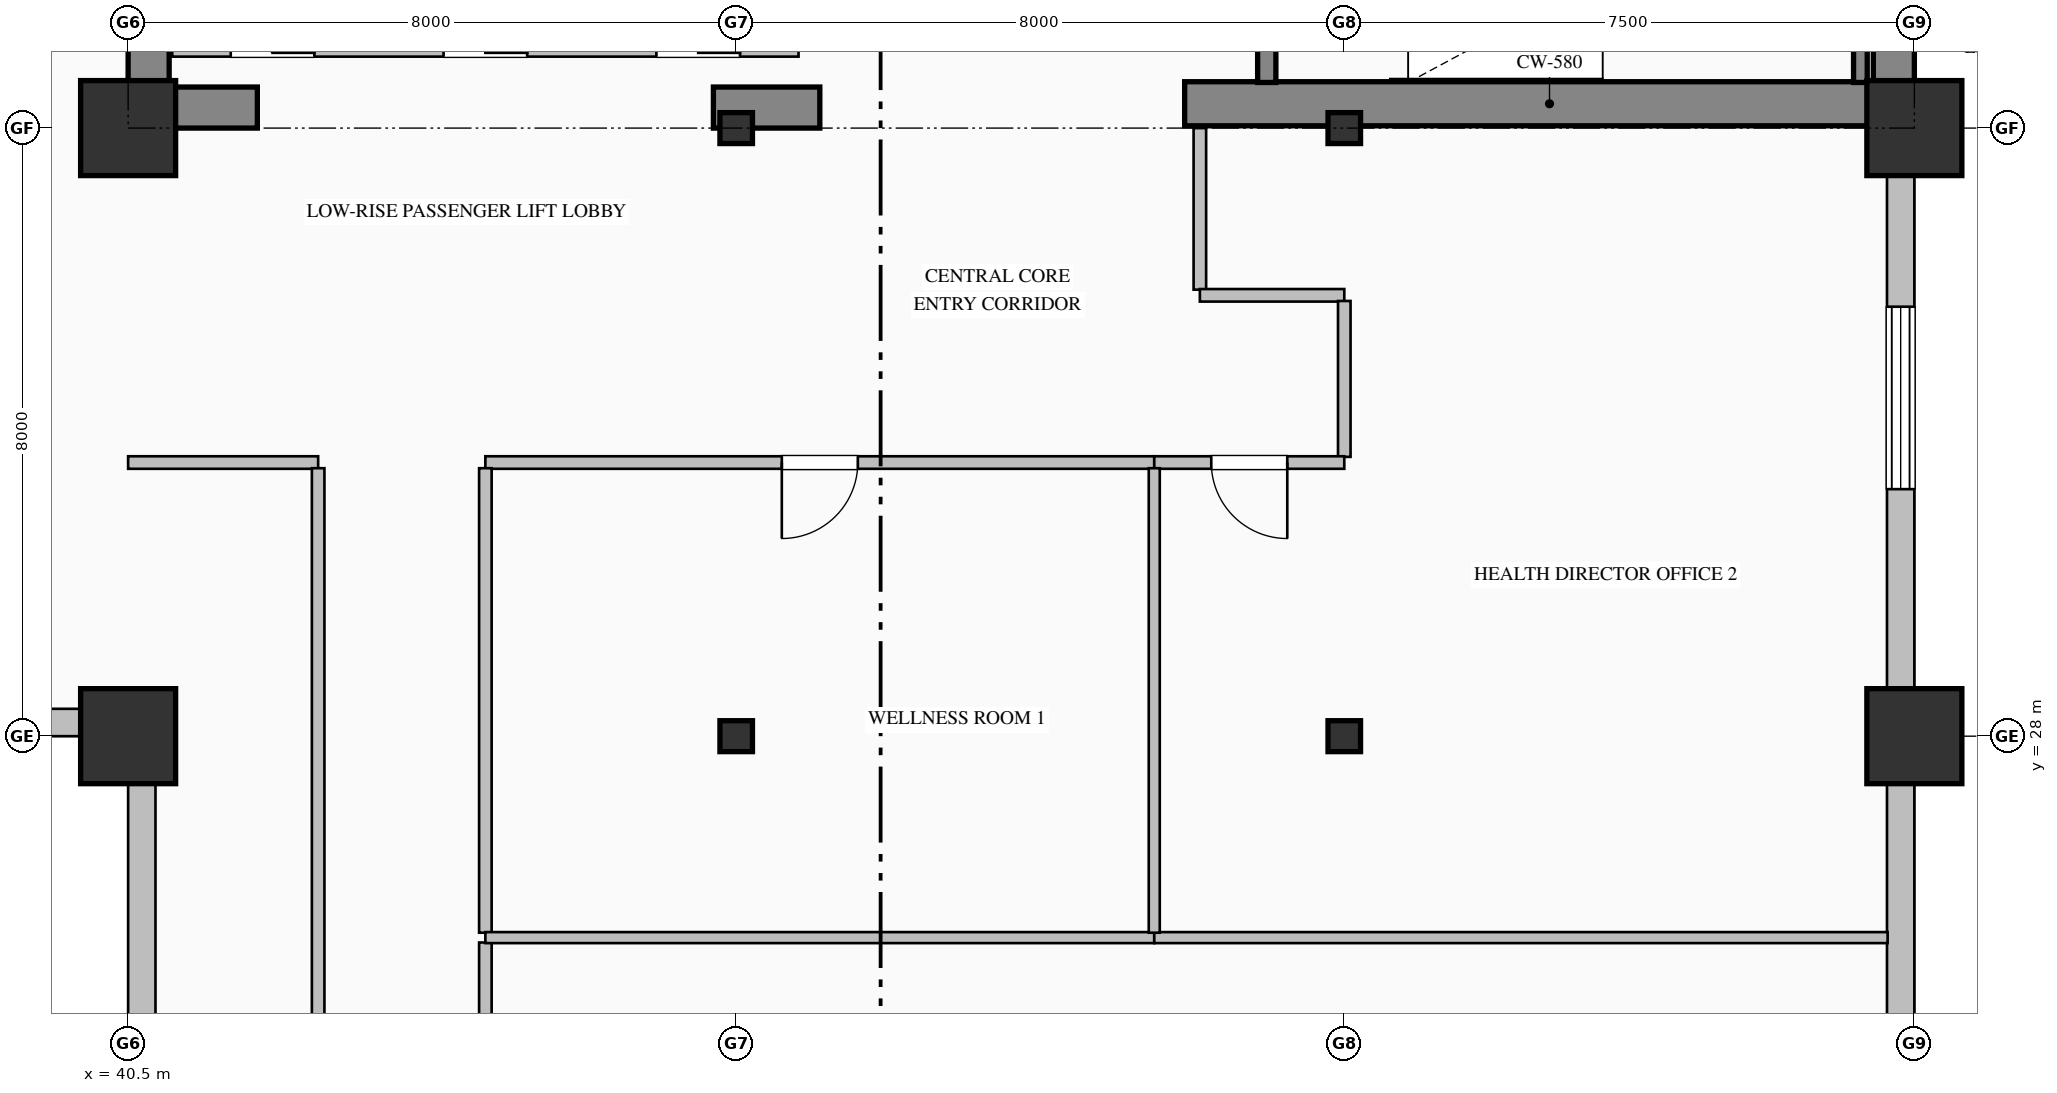
"""IFC4 building model, lengths in metres.
Left out: names, types, materials, properties, quantities, classifications, styles, units other than length and angle.
Written with IfcOpenShell. Run it as: python <this file> out.ifc"""

import sys

from ifc_helpers import new_model, si_unit, direction, frame, frame_2d, origin, origin_2d, place, context, subcontext, project, spatial, rectangle, hollow_rectangle, i_section, extrude, element, fill, save


model = new_model("IFC4")
c1 = context("Model", 3, precision=1e-05, world=origin(), true_north=direction((0.0, 1.0)))
c2 = subcontext(c1, "Body", "Model", "MODEL_VIEW")
j1 = project(units=[si_unit("LENGTHUNIT", "METRE"), si_unit("PLANEANGLEUNIT", "RADIAN")], contexts=[c1])
p1 = place(None, origin())
s1 = spatial("IfcSite", under=j1, at=p1, CompositionType="ELEMENT")
p2 = place(p1, origin())
s2 = spatial("IfcBuilding", under=s1, at=p2, CompositionType="ELEMENT")
p3 = place(p2, frame((0.0, 0.0, 84.2)))
s3 = spatial("IfcBuildingStorey", under=s2, at=p3, CompositionType="ELEMENT", Elevation=84.2)
p4 = place(p3, frame((63.73, 36.32, 0.0), z_axis=(0.0, 0.0, 1.0), x_axis=(0.0, 1.0, 0.0)))
e1 = element("IfcWall", 1, at=p4, inside=s3, PredefinedType="SHEAR", context=c2, shape_type="SweptSolid", body=[
    extrude(rectangle(XDim=15.14, YDim=0.54, at=frame_2d((7.57, 0.0))), origin(), (0.0, 0.0, 1.0), 3.75),
])
p5 = place(p3, frame((40.77, 36.54, 0.0), z_axis=(0.0, 0.0, 1.0), x_axis=(0.0, 1.0, 0.0)))
e2 = element("IfcWall", 2, at=p5, inside=s3, PredefinedType="SHEAR", context=c2, shape_type="SweptSolid", body=[
    extrude(rectangle(XDim=7.86, YDim=0.54, at=frame_2d((3.93, 0.0))), origin(), (0.0, 0.0, 1.0), 3.75),
])
p6 = place(p3, frame((40.5, 36.27, 0.0), z_axis=(0.0, 0.0, 1.0), x_axis=(1.0, 0.0, 0.0)))
e3 = element("IfcWall", 3, at=p6, inside=s3, PredefinedType="SHEAR", context=c2, shape_type="SweptSolid", body=[
    extrude(rectangle(XDim=1.7, YDim=0.54, at=frame_2d((0.85, 0.0))), origin(), (0.0, 0.0, 1.0), 3.75),
])
p7 = place(p3, frame((48.2, 36.27, 0.0), z_axis=(0.0, 0.0, 1.0), x_axis=(1.0, 0.0, 0.0)))
e4 = element("IfcWall", 4, at=p7, inside=s3, PredefinedType="SHEAR", context=c2, shape_type="SweptSolid", body=[
    extrude(rectangle(XDim=1.4, YDim=0.54, at=frame_2d((0.7, 0.0))), origin(), (0.0, 0.0, 1.0), 3.75),
])
p8 = place(p3, frame((54.4, 36.32, 0.0), z_axis=(0.0, 0.0, 1.0), x_axis=(1.0, 0.0, 0.0)))
e5 = element("IfcWall", 5, at=p8, inside=s3, PredefinedType="SHEAR", context=c2, shape_type="SweptSolid", body=[
    extrude(rectangle(XDim=9.6, YDim=0.58, at=frame_2d((4.8, 0.0))), origin(), (0.0, 0.0, 1.0), 4.0),
])
for number, where, z_axis, x_axis in (
    (6, (40.5, 28.0, 0.0), (0.0, 0.0, 1.0), (1.0, 0.0, 0.0)),
    (7, (40.5, 36.0, 0.0), (0.0, 0.0, 1.0), (1.0, 0.0, 0.0)),
):
    element("IfcColumn", number, at=place(p3, frame(where, z_axis=z_axis, x_axis=x_axis)), inside=s3, PredefinedType="COLUMN", context=c2, shape_type="SweptSolid", body=[
        extrude(hollow_rectangle(XDim=1.25, YDim=1.25, WallThickness=0.045, at=origin_2d()), origin(), (0.0, 0.0, 1.0), 4.0),
    ])
for number, where, z_axis, x_axis in (
    (8, (48.5, 28.0, 0.0), (0.0, 0.0, 1.0), (1.0, 0.0, 0.0)),
    (9, (48.5, 36.0, 0.0), (0.0, 0.0, 1.0), (1.0, 0.0, 0.0)),
    (10, (56.5, 28.0, 0.0), (0.0, 0.0, 1.0), (1.0, 0.0, 0.0)),
    (11, (56.5, 36.0, 0.0), (0.0, 0.0, 1.0), (1.0, 0.0, 0.0)),
):
    element("IfcColumn", number, at=place(p3, frame(where, z_axis=z_axis, x_axis=x_axis)), inside=s3, PredefinedType="COLUMN", context=c2, shape_type="SweptSolid", body=[
        extrude(i_section(OverallWidth=0.407, OverallDepth=0.428, WebThickness=0.02, FlangeThickness=0.035, FilletRadius=0.022, at=origin_2d()), origin(), (0.0, 0.0, 1.0), 4.0),
    ])
for number, where, z_axis, x_axis in (
    (12, (64.0, 28.0, 0.0), (0.0, 0.0, 1.0), (1.0, 0.0, 0.0)),
    (13, (64.0, 36.0, 0.0), (0.0, 0.0, 1.0), (1.0, 0.0, 0.0)),
):
    element("IfcColumn", number, at=place(p3, frame(where, z_axis=z_axis, x_axis=x_axis)), inside=s3, PredefinedType="COLUMN", context=c2, shape_type="SweptSolid", body=[
        extrude(hollow_rectangle(XDim=1.25, YDim=1.25, WallThickness=0.045, at=origin_2d()), origin(), (0.0, 0.0, 1.0), 4.0),
    ])
p9 = place(p3, frame((40.68, 8.0, 0.0), z_axis=(0.0, 0.0, 1.0), x_axis=(0.0, 1.0, 0.0)))
e14 = element("IfcWall", 14, at=p9, inside=s3, PredefinedType="SOLIDWALL", context=c2, shape_type="SweptSolid", body=[
    extrude(rectangle(XDim=20.36, YDim=0.36, at=frame_2d((10.18, 0.0))), origin(), (0.0, 0.0, 1.0), 3.05),
])
p10 = place(p9, frame((6.6, 0.0, 0.7)))
e15 = element("IfcOpeningElement", 15, at=p10, cuts=e14, PredefinedType="OPENING", context=c2, shape_type="SweptSolid", body=[
    extrude(rectangle(XDim=1.2, YDim=1.85, at=frame_2d((0.6, 0.925))), frame((0.0, 0.19, 0.0), z_axis=(0.0, -1.0, 0.0), x_axis=(1.0, 0.0, 0.0)), (0.0, 0.0, 1.0), 0.38),
])
p11 = place(p9, frame((13.8, 0.0, 0.7)))
e16 = element("IfcOpeningElement", 16, at=p11, cuts=e14, PredefinedType="OPENING", context=c2, shape_type="SweptSolid", body=[
    extrude(rectangle(XDim=1.2, YDim=1.85, at=frame_2d((0.6, 0.925))), frame((0.0, 0.19, 0.0), z_axis=(0.0, -1.0, 0.0), x_axis=(1.0, 0.0, 0.0)), (0.0, 0.0, 1.0), 0.38),
])
p12 = place(p3, frame((40.52, 28.18, 0.0), z_axis=(0.0, 0.0, 1.0), x_axis=(-1.0, 0.0, 0.0)))
e17 = element("IfcWall", 17, at=p12, inside=s3, PredefinedType="SOLIDWALL", context=c2, shape_type="SweptSolid", body=[
    extrude(rectangle(XDim=36.52, YDim=0.36, at=frame_2d((18.26, 0.0))), origin(), (0.0, 0.0, 1.0), 3.05),
])
p13 = place(p12, frame((10.2, 0.0, 0.7)))
e18 = element("IfcOpeningElement", 18, at=p13, cuts=e17, PredefinedType="OPENING", context=c2, shape_type="SweptSolid", body=[
    extrude(rectangle(XDim=1.2, YDim=1.85, at=frame_2d((0.6, 0.925))), frame((0.0, 0.19, 0.0), z_axis=(0.0, -1.0, 0.0), x_axis=(1.0, 0.0, 0.0)), (0.0, 0.0, 1.0), 0.38),
])
p14 = place(p12, frame((17.4, 0.0, 0.7)))
e19 = element("IfcOpeningElement", 19, at=p14, cuts=e17, PredefinedType="OPENING", context=c2, shape_type="SweptSolid", body=[
    extrude(rectangle(XDim=1.2, YDim=1.85, at=frame_2d((0.6, 0.925))), frame((0.0, 0.19, 0.0), z_axis=(0.0, -1.0, 0.0), x_axis=(1.0, 0.0, 0.0)), (0.0, 0.0, 1.0), 0.38),
])
p15 = place(p12, frame((21.0, 0.0, 0.7)))
e20 = element("IfcOpeningElement", 20, at=p15, cuts=e17, PredefinedType="OPENING", context=c2, shape_type="SweptSolid", body=[
    extrude(rectangle(XDim=1.2, YDim=1.85, at=frame_2d((0.6, 0.925))), frame((0.0, 0.19, 0.0), z_axis=(0.0, -1.0, 0.0), x_axis=(1.0, 0.0, 0.0)), (0.0, 0.0, 1.0), 0.38),
])
p16 = place(p12, frame((28.2, 0.0, 0.7)))
e21 = element("IfcOpeningElement", 21, at=p16, cuts=e17, PredefinedType="OPENING", context=c2, shape_type="SweptSolid", body=[
    extrude(rectangle(XDim=1.2, YDim=1.85, at=frame_2d((0.6, 0.925))), frame((0.0, 0.19, 0.0), z_axis=(0.0, -1.0, 0.0), x_axis=(1.0, 0.0, 0.0)), (0.0, 0.0, 1.0), 0.38),
])
p17 = place(p3, frame((63.82, 36.05, 0.0), z_axis=(0.0, 0.0, 1.0), x_axis=(0.0, -1.0, 0.0)))
e22 = element("IfcWall", 22, at=p17, inside=s3, PredefinedType="SOLIDWALL", context=c2, shape_type="SweptSolid", body=[
    extrude(rectangle(XDim=28.05, YDim=0.36, at=frame_2d((14.025, 0.0))), origin(), (0.0, 0.0, 1.0), 3.25),
])
p18 = place(p17, frame((2.4, 0.0, 0.8)))
e23 = element("IfcOpeningElement", 23, at=p18, cuts=e22, PredefinedType="OPENING", context=c2, shape_type="SweptSolid", body=[
    extrude(rectangle(XDim=2.4, YDim=2.15, at=frame_2d((1.2, 1.075))), frame((0.0, 0.19, 0.0), z_axis=(0.0, -1.0, 0.0), x_axis=(1.0, 0.0, 0.0)), (0.0, 0.0, 1.0), 0.38),
])
p19 = place(p17, frame((13.2, 0.0, 0.8)))
e24 = element("IfcOpeningElement", 24, at=p19, cuts=e22, PredefinedType="OPENING", context=c2, shape_type="SweptSolid", body=[
    extrude(rectangle(XDim=2.4, YDim=2.15, at=frame_2d((1.2, 1.075))), frame((0.0, 0.19, 0.0), z_axis=(0.0, -1.0, 0.0), x_axis=(1.0, 0.0, 0.0)), (0.0, 0.0, 1.0), 0.38),
])
p20 = place(p3, frame((55.48, 39.75, 0.0), z_axis=(0.0, 0.0, 1.0), x_axis=(0.0, -1.0, 0.0)))
e25 = element("IfcWall", 25, at=p20, inside=s3, PredefinedType="SOLIDWALL", context=c2, shape_type="SweptSolid", body=[
    extrude(rectangle(XDim=3.15, YDim=0.24, at=frame_2d((1.575, 0.0))), origin(), (0.0, 0.0, 1.0), 4.0),
])
p21 = place(p20, frame((1.0, 0.0, 0.0)))
e26 = element("IfcOpeningElement", 26, at=p21, cuts=e25, PredefinedType="OPENING", context=c2, shape_type="SweptSolid", body=[
    extrude(rectangle(XDim=1.15, YDim=2.2, at=frame_2d((0.575, 1.1))), frame((0.0, 0.13, 0.0), z_axis=(0.0, -1.0, 0.0), x_axis=(1.0, 0.0, 0.0)), (0.0, 0.0, 1.0), 0.26),
])
p22 = place(p3, frame((63.29, 36.6, 0.0), z_axis=(0.0, 0.0, 1.0), x_axis=(0.0, 1.0, 0.0)))
e27 = element("IfcWall", 27, at=p22, inside=s3, PredefinedType="SOLIDWALL", context=c2, shape_type="SweptSolid", body=[
    extrude(rectangle(XDim=3.15, YDim=0.18, at=frame_2d((1.575, 0.0))), origin(), (0.0, 0.0, 1.0), 4.0),
])
p23 = place(p3, frame((49.32, 37.05, 0.0), z_axis=(0.0, 0.0, 1.0), x_axis=(-1.0, 0.0, 0.0)))
e28 = element("IfcWall", 28, at=p23, inside=s3, PredefinedType="PARTITIONING", context=c2, shape_type="SweptSolid", body=[
    extrude(rectangle(XDim=8.24, YDim=0.22, at=frame_2d((4.12, 0.0))), origin(), (0.0, 0.0, 1.0), 3.75),
])
p24 = place(p23, frame((6.37, 0.0, 0.0)))
e29 = element("IfcOpeningElement", 29, at=p24, cuts=e28, PredefinedType="OPENING", context=c2, shape_type="SweptSolid", body=[
    extrude(rectangle(XDim=1.1, YDim=2.2, at=frame_2d((0.55, 1.1))), frame((0.0, 0.12, 0.0), z_axis=(0.0, -1.0, 0.0), x_axis=(1.0, 0.0, 0.0)), (0.0, 0.0, 1.0), 0.24),
])
p25 = place(p23, frame((3.57, 0.0, 0.0)))
e30 = element("IfcOpeningElement", 30, at=p25, cuts=e28, PredefinedType="OPENING", context=c2, shape_type="SweptSolid", body=[
    extrude(rectangle(XDim=1.1, YDim=2.2, at=frame_2d((0.55, 1.1))), frame((0.0, 0.12, 0.0), z_axis=(0.0, -1.0, 0.0), x_axis=(1.0, 0.0, 0.0)), (0.0, 0.0, 1.0), 0.24),
])
p26 = place(p23, frame((0.77, 0.0, 0.0)))
e31 = element("IfcOpeningElement", 31, at=p26, cuts=e28, PredefinedType="OPENING", context=c2, shape_type="SweptSolid", body=[
    extrude(rectangle(XDim=1.1, YDim=2.2, at=frame_2d((0.55, 1.1))), frame((0.0, 0.12, 0.0), z_axis=(0.0, -1.0, 0.0), x_axis=(1.0, 0.0, 0.0)), (0.0, 0.0, 1.0), 0.24),
])
p27 = place(p3, frame((54.0, 31.6, 0.0), z_axis=(0.0, 0.0, 1.0), x_axis=(-1.0, 0.0, 0.0)))
e32 = element("IfcWall", 32, at=p27, inside=s3, PredefinedType="PARTITIONING", context=c2, shape_type="SweptSolid", body=[
    extrude(rectangle(XDim=8.8, YDim=0.165, at=frame_2d((4.4, 0.0))), origin(), (0.0, 0.0, 1.0), 3.75),
])
p28 = place(p27, frame((3.9, 0.0, 0.0)))
e33 = element("IfcOpeningElement", 33, at=p28, cuts=e32, PredefinedType="OPENING", context=c2, shape_type="SweptSolid", body=[
    extrude(rectangle(XDim=1.0, YDim=2.15, at=frame_2d((0.5, 1.075))), frame((0.0, 0.093, 0.0), z_axis=(0.0, -1.0, 0.0), x_axis=(1.0, 0.0, 0.0)), (0.0, 0.0, 1.0), 0.185),
])
p29 = place(p3, frame((54.6, 36.0, 0.0), z_axis=(0.0, 0.0, 1.0), x_axis=(0.0, -1.0, 0.0)))
e34 = element("IfcWall", 34, at=p29, inside=s3, PredefinedType="PARTITIONING", context=c2, shape_type="SweptSolid", body=[
    extrude(rectangle(XDim=2.125, YDim=0.165, at=frame_2d((1.063, 0.0))), origin(), (0.0, 0.0, 1.0), 3.75),
])
p30 = place(p3, frame((54.6, 33.8, 0.0), z_axis=(0.0, 0.0, 1.0), x_axis=(1.0, 0.0, 0.0)))
e35 = element("IfcWall", 35, at=p30, inside=s3, PredefinedType="PARTITIONING", context=c2, shape_type="SweptSolid", body=[
    extrude(rectangle(XDim=1.9, YDim=0.165, at=frame_2d((0.95, 0.0))), origin(), (0.0, 0.0, 1.0), 3.75),
])
p31 = place(p3, frame((56.5, 33.726, 0.0), z_axis=(0.0, 0.0, 1.0), x_axis=(0.0, -1.0, 0.0)))
e36 = element("IfcWall", 36, at=p31, inside=s3, PredefinedType="PARTITIONING", context=c2, shape_type="SweptSolid", body=[
    extrude(rectangle(XDim=2.051, YDim=0.165, at=frame_2d((1.025, 0.0))), origin(), (0.0, 0.0, 1.0), 3.042),
])
p32 = place(p3, frame((56.5, 31.6, 0.0), z_axis=(0.0, 0.0, 1.0), x_axis=(-1.0, 0.0, 0.0)))
e37 = element("IfcWall", 37, at=p32, inside=s3, PredefinedType="PARTITIONING", context=c2, shape_type="SweptSolid", body=[
    extrude(rectangle(XDim=2.5, YDim=0.165, at=frame_2d((1.25, 0.0))), origin(), (0.0, 0.0, 1.0), 3.75),
])
p33 = place(p32, frame((0.75, 0.0, 0.0)))
e38 = element("IfcOpeningElement", 38, at=p33, cuts=e37, PredefinedType="OPENING", context=c2, shape_type="SweptSolid", body=[
    extrude(rectangle(XDim=1.0, YDim=2.15, at=frame_2d((0.5, 1.075))), frame((0.0, 0.093, 0.0), z_axis=(0.0, -1.0, 0.0), x_axis=(1.0, 0.0, 0.0)), (0.0, 0.0, 1.0), 0.185),
])
p34 = place(p3, frame((43.0, 31.6, 0.0), z_axis=(0.0, 0.0, 1.0), x_axis=(-1.0, 0.0, 0.0)))
e39 = element("IfcWall", 39, at=p34, inside=s3, PredefinedType="PARTITIONING", context=c2, shape_type="SweptSolid", body=[
    extrude(rectangle(XDim=2.5, YDim=0.165, at=frame_2d((1.25, 0.0))), origin(), (0.0, 0.0, 1.0), 3.75),
])
p35 = place(p3, frame((45.2, 25.285, 0.0), z_axis=(0.0, 0.0, 1.0), x_axis=(0.0, -1.0, 0.0)))
e40 = element("IfcWall", 40, at=p35, inside=s3, PredefinedType="PARTITIONING", context=c2, shape_type="SweptSolid", body=[
    extrude(rectangle(XDim=10.511, YDim=0.165, at=frame_2d((5.255, 0.0))), origin(), (0.0, 0.0, 1.0), 3.75),
])
p36 = place(p3, frame((45.2, 31.525, 0.0), z_axis=(0.0, 0.0, 1.0), x_axis=(0.0, -1.0, 0.0)))
e41 = element("IfcWall", 41, at=p36, inside=s3, PredefinedType="PARTITIONING", context=c2, shape_type="SweptSolid", body=[
    extrude(rectangle(XDim=6.111, YDim=0.165, at=frame_2d((3.055, 0.0))), origin(), (0.0, 0.0, 1.0), 3.75),
])
p37 = place(p3, frame((43.0, 12.574, 0.0), z_axis=(0.0, 0.0, 1.0), x_axis=(0.0, 1.0, 0.0)))
e42 = element("IfcWall", 42, at=p37, inside=s3, PredefinedType="PARTITIONING", context=c2, shape_type="SweptSolid", body=[
    extrude(rectangle(XDim=18.951, YDim=0.165, at=frame_2d((9.476, 0.0))), origin(), (0.0, 0.0, 1.0), 3.75),
])
p38 = place(p37, frame((9.025, 0.0, 0.0)))
e43 = element("IfcOpeningElement", 43, at=p38, cuts=e42, PredefinedType="OPENING", context=c2, shape_type="SweptSolid", body=[
    extrude(rectangle(XDim=0.9, YDim=2.15, at=frame_2d((0.45, 1.075))), frame((0.0, 0.093, 0.0), z_axis=(0.0, -1.0, 0.0), x_axis=(1.0, 0.0, 0.0)), (0.0, 0.0, 1.0), 0.185),
])
p39 = place(p3, frame((45.2, 25.35, 0.0), z_axis=(0.0, 0.0, 1.0), x_axis=(1.0, 0.0, 0.0)))
e44 = element("IfcWall", 44, at=p39, inside=s3, PredefinedType="PARTITIONING", context=c2, shape_type="SweptSolid", body=[
    extrude(rectangle(XDim=8.8, YDim=0.145, at=frame_2d((4.4, 0.0))), origin(), (0.0, 0.0, 1.0), 3.75),
])
p40 = place(p3, frame((54.0, 25.35, 0.0), z_axis=(0.0, 0.0, 1.0), x_axis=(1.0, 0.0, 0.0)))
e45 = element("IfcWall", 45, at=p40, inside=s3, PredefinedType="PARTITIONING", context=c2, shape_type="SweptSolid", body=[
    extrude(rectangle(XDim=9.648, YDim=0.145, at=frame_2d((4.824, 0.0))), origin(), (0.0, 0.0, 1.0), 3.75),
])
p41 = place(p3, frame((54.0, 31.525, 0.0), z_axis=(0.0, 0.0, 1.0), x_axis=(0.0, -1.0, 0.0)))
e46 = element("IfcWall", 46, at=p41, inside=s3, PredefinedType="PARTITIONING", context=c2, shape_type="SweptSolid", body=[
    extrude(rectangle(XDim=6.111, YDim=0.145, at=frame_2d((3.055, 0.0))), origin(), (0.0, 0.0, 1.0), 3.75),
])
p42 = place(p18, origin())
e47 = element("IfcWindow", 47, at=p42, inside=s3, PartitioningType="TRIPLE_PANEL_VERTICAL", PredefinedType="WINDOW", context=c2, shape_type="SweptSolid", body=[
    extrude(rectangle(XDim=2.4, YDim=2.15, at=frame_2d((1.2, 1.075))), frame((0.0, 0.15, 0.0), z_axis=(0.0, -1.0, 0.0), x_axis=(1.0, 0.0, 0.0)), (0.0, 0.0, 1.0), 0.06),
])
fill(e23, e47)
p43 = place(p28, origin())
e48 = element("IfcDoor", 48, at=p43, inside=s3, OperationType="SINGLE_SWING_RIGHT", PredefinedType="DOOR", context=c2, shape_type="SweptSolid", body=[
    extrude(rectangle(XDim=1.0, YDim=2.15, at=frame_2d((0.5, 1.075))), frame((0.0, 0.025, 0.0), z_axis=(0.0, -1.0, 0.0), x_axis=(1.0, 0.0, 0.0)), (0.0, 0.0, 1.0), 0.05),
])
fill(e33, e48)
p44 = place(p33, origin())
e49 = element("IfcDoor", 49, at=p44, inside=s3, OperationType="SINGLE_SWING_LEFT", PredefinedType="DOOR", context=c2, shape_type="SweptSolid", body=[
    extrude(rectangle(XDim=1.0, YDim=2.15, at=frame_2d((0.5, 1.075))), frame((0.0, 0.025, 0.0), z_axis=(0.0, -1.0, 0.0), x_axis=(1.0, 0.0, 0.0)), (0.0, 0.0, 1.0), 0.05),
])
fill(e38, e49)
save(model, sys.argv[1])
